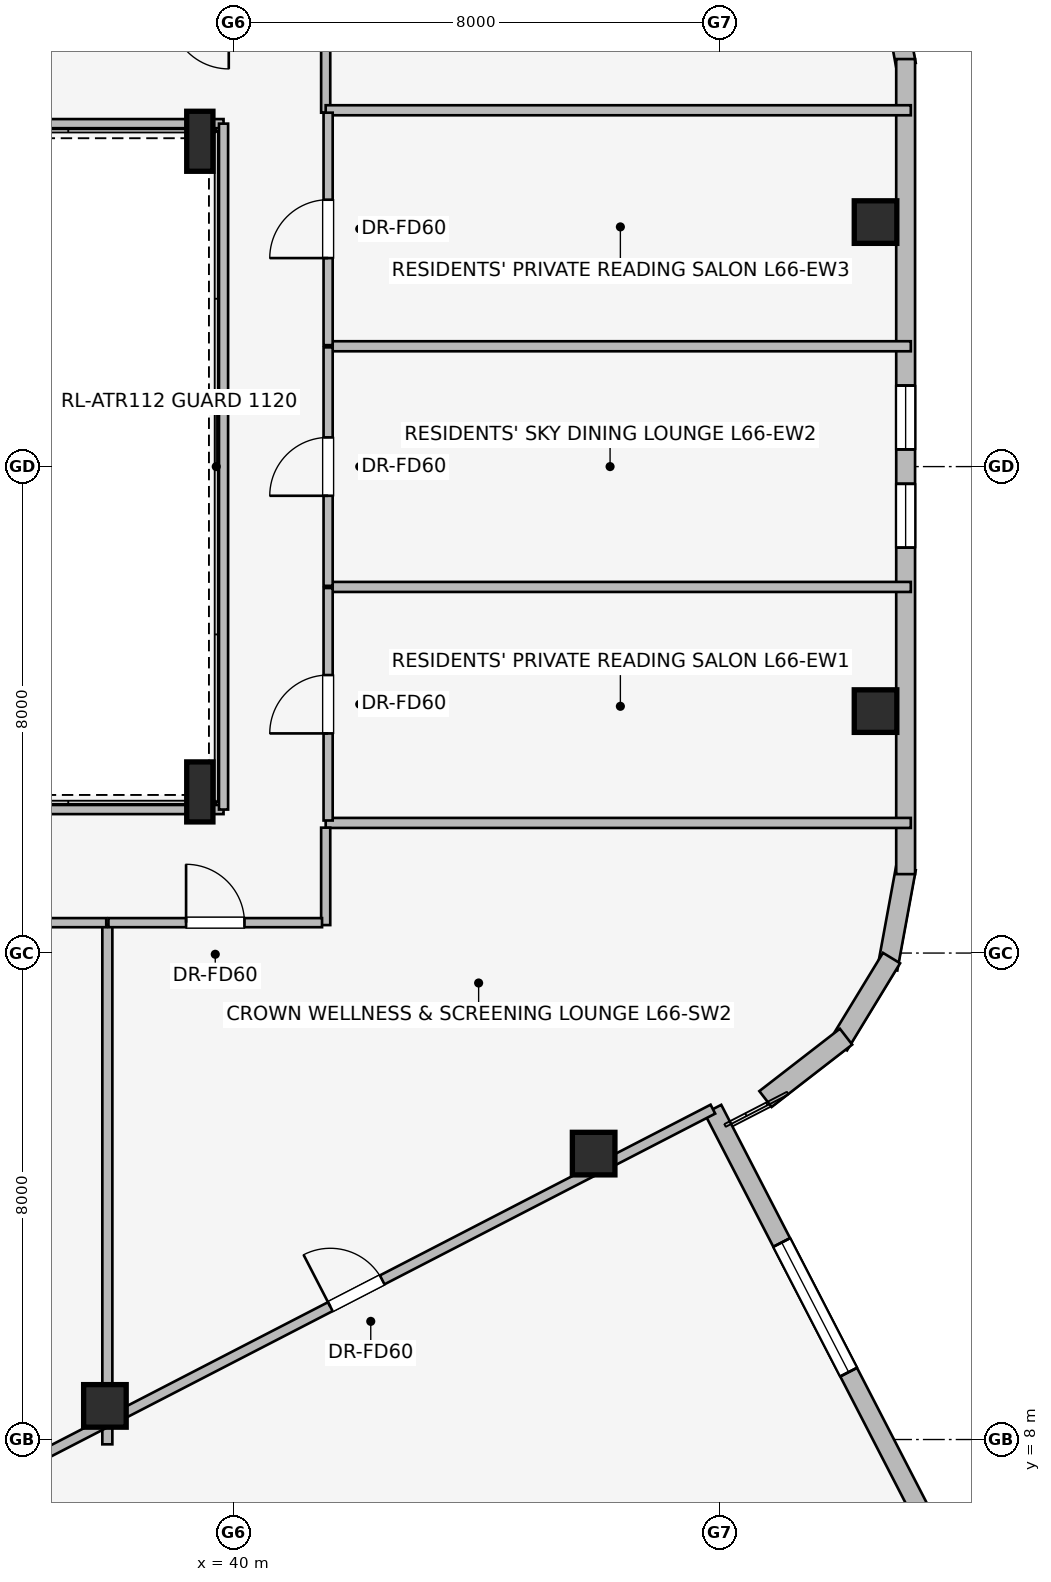
"""IFC4 building model, lengths in metres.
Left out: names, types, materials, properties, quantities, classifications, styles, units other than length and angle.
Written with IfcOpenShell. Run it as: python <this file> out.ifc"""

import sys

from ifc_helpers import new_model, si_unit, direction, frame, frame_2d, origin, origin_2d, place, context, subcontext, project, spatial, rectangle, i_section, extrude, element, fill, save


model = new_model("IFC4")
c1 = context("Model", 3, precision=1e-05, world=origin(), true_north=direction((0.0, 1.0)))
c2 = subcontext(c1, "Body", "Model", "MODEL_VIEW")
j1 = project(units=[si_unit("LENGTHUNIT", "METRE"), si_unit("PLANEANGLEUNIT", "RADIAN")], contexts=[c1])
p1 = place(None, origin())
s1 = spatial("IfcSite", under=j1, at=p1, CompositionType="ELEMENT")
p2 = place(p1, origin())
s2 = spatial("IfcBuilding", under=s1, at=p2, CompositionType="ELEMENT")
p3 = place(p2, frame((0.0, 0.0, 241.9)))
s3 = spatial("IfcBuildingStorey", under=s2, at=p3, CompositionType="ELEMENT", Elevation=241.9)
for number, where, z_axis, x_axis in (
    (1, (37.889, 8.553, 0.0), (0.0, 0.0, 1.0), (1.0, 0.0, 0.0)),
    (2, (45.927, 12.702, 0.0), (0.0, 0.0, 1.0), (1.0, 0.0, 0.0)),
    (3, (50.563, 19.979, 0.0), (0.0, 0.0, 1.0), (1.0, 0.0, 0.0)),
    (4, (50.563, 28.021, 0.0), (0.0, 0.0, 1.0), (1.0, 0.0, 0.0)),
):
    element("IfcColumn", number, at=place(p3, frame(where, z_axis=z_axis, x_axis=x_axis)), inside=s3, PredefinedType="COLUMN", context=c2, shape_type="SweptSolid", body=[
        extrude(rectangle(XDim=0.7, YDim=0.7, at=origin_2d()), origin(), (0.0, 0.0, 1.0), 3.55),
    ])
for number, where, z_axis, x_axis in (
    (5, (39.45, 18.65, 0.0), (0.0, 0.0, 1.0), (1.0, 0.0, 0.0)),
    (6, (39.45, 29.35, 0.0), (0.0, 0.0, 1.0), (1.0, 0.0, 0.0)),
):
    element("IfcColumn", number, at=place(p3, frame(where, z_axis=z_axis, x_axis=x_axis)), inside=s3, PredefinedType="COLUMN", context=c2, shape_type="SweptSolid", body=[
        extrude(i_section(OverallWidth=0.431, OverallDepth=0.987, WebThickness=0.034, FlangeThickness=0.062, at=origin_2d()), origin(), (0.0, 0.0, 1.0), 3.55),
    ])
p4 = place(p3, frame((50.759, 32.257, 0.0), z_axis=(0.0, 0.0, 1.0), x_axis=(0.180691763044, -0.983539773862, 0.0)))
e7 = element("IfcWall", 7, at=p4, inside=s3, PredefinedType="STANDARD", context=c2, shape_type="SweptSolid", body=[
    extrude(rectangle(XDim=1.677, YDim=0.33, at=frame_2d((0.838, 0.0))), origin(), (0.0, 0.0, 1.0), 3.29),
])
p5 = place(p3, frame((45.241, -10.216, 0.0), z_axis=(0.0, 0.0, 1.0), x_axis=(-0.45873211625, 0.888574614493, 0.0)))
e8 = element("IfcWall", 8, at=p5, inside=s3, PredefinedType="STANDARD", context=c2, shape_type="SweptSolid", body=[
    extrude(rectangle(XDim=19.8, YDim=0.31, at=frame_2d((9.9, 0.0))), origin(), (0.0, 0.0, 1.0), 3.29),
])
p6 = place(p5, frame((2.467, 0.0, 0.75)))
e9 = element("IfcOpeningElement", 9, at=p6, cuts=e8, PredefinedType="OPENING", context=c2, shape_type="SweptSolid", body=[
    extrude(rectangle(XDim=2.4, YDim=1.6, at=frame_2d((1.2, 0.8))), frame((0.0, 0.165, 0.0), z_axis=(0.0, -1.0, 0.0), x_axis=(1.0, 0.0, 0.0)), (0.0, 0.0, 1.0), 0.33),
])
p7 = place(p5, frame((8.7, 0.0, 0.75)))
e10 = element("IfcOpeningElement", 10, at=p7, cuts=e8, PredefinedType="OPENING", context=c2, shape_type="SweptSolid", body=[
    extrude(rectangle(XDim=2.4, YDim=1.6, at=frame_2d((1.2, 0.8))), frame((0.0, 0.165, 0.0), z_axis=(0.0, -1.0, 0.0), x_axis=(1.0, 0.0, 0.0)), (0.0, 0.0, 1.0), 0.33),
])
p8 = place(p5, frame((14.934, 0.0, 0.75)))
e11 = element("IfcOpeningElement", 11, at=p8, cuts=e8, PredefinedType="OPENING", context=c2, shape_type="SweptSolid", body=[
    extrude(rectangle(XDim=2.4, YDim=1.6, at=frame_2d((1.2, 0.8))), frame((0.0, 0.165, 0.0), z_axis=(0.0, -1.0, 0.0), x_axis=(1.0, 0.0, 0.0)), (0.0, 0.0, 1.0), 0.33),
])
p9 = place(p3, frame((47.888, 13.433, 0.0), z_axis=(0.0, 0.0, 1.0), x_axis=(0.458693173014, -0.888594718097, 0.0)))
e12 = element("IfcWall", 12, at=p9, inside=s3, PredefinedType="STANDARD", context=c2, shape_type="SweptSolid", body=[
    extrude(rectangle(XDim=19.8, YDim=0.31, at=frame_2d((9.9, 0.0))), origin(), (0.0, 0.0, 1.0), 3.29),
])
p10 = place(p9, frame((2.467, 0.0, 0.75)))
e13 = element("IfcOpeningElement", 13, at=p10, cuts=e12, PredefinedType="OPENING", context=c2, shape_type="SweptSolid", body=[
    extrude(rectangle(XDim=2.4, YDim=1.6, at=frame_2d((1.2, 0.8))), frame((0.0, 0.165, 0.0), z_axis=(0.0, -1.0, 0.0), x_axis=(1.0, 0.0, 0.0)), (0.0, 0.0, 1.0), 0.33),
])
p11 = place(p9, frame((8.7, 0.0, 0.75)))
e14 = element("IfcOpeningElement", 14, at=p11, cuts=e12, PredefinedType="OPENING", context=c2, shape_type="SweptSolid", body=[
    extrude(rectangle(XDim=2.4, YDim=1.6, at=frame_2d((1.2, 0.8))), frame((0.0, 0.165, 0.0), z_axis=(0.0, -1.0, 0.0), x_axis=(1.0, 0.0, 0.0)), (0.0, 0.0, 1.0), 0.33),
])
p12 = place(p9, frame((14.933, 0.0, 0.75)))
e15 = element("IfcOpeningElement", 15, at=p12, cuts=e12, PredefinedType="OPENING", context=c2, shape_type="SweptSolid", body=[
    extrude(rectangle(XDim=2.4, YDim=1.6, at=frame_2d((1.2, 0.8))), frame((0.0, 0.165, 0.0), z_axis=(0.0, -1.0, 0.0), x_axis=(1.0, 0.0, 0.0)), (0.0, 0.0, 1.0), 0.33),
])
p13 = place(p3, frame((51.062, 17.392, 0.0), z_axis=(0.0, 0.0, 1.0), x_axis=(-0.180691763044, -0.983539773862, 0.0)))
e16 = element("IfcWall", 16, at=p13, inside=s3, PredefinedType="STANDARD", context=c2, shape_type="SweptSolid", body=[
    extrude(rectangle(XDim=1.677, YDim=0.33, at=frame_2d((0.838, 0.0))), origin(), (0.0, 0.0, 1.0), 3.29),
])
p14 = place(p3, frame((50.826, 15.918, 0.0), z_axis=(0.0, 0.0, 1.0), x_axis=(-0.520325409202, -0.853968072318, 0.0)))
e17 = element("IfcWall", 17, at=p14, inside=s3, PredefinedType="STANDARD", context=c2, shape_type="SweptSolid", body=[
    extrude(rectangle(XDim=1.678, YDim=0.33, at=frame_2d((0.839, 0.0))), origin(), (0.0, 0.0, 1.0), 3.29),
])
p15 = place(p3, frame((50.078, 14.625, 0.0), z_axis=(0.0, 0.0, 1.0), x_axis=(-0.790691856293, -0.61221433207, 0.0)))
e18 = element("IfcWall", 18, at=p15, inside=s3, PredefinedType="STANDARD", context=c2, shape_type="SweptSolid", body=[
    extrude(rectangle(XDim=1.676, YDim=0.33, at=frame_2d((0.838, 0.0))), origin(), (0.0, 0.0, 1.0), 3.29),
])
p16 = place(p3, frame((51.058, 30.702, 0.0), z_axis=(0.0, 0.0, 1.0), x_axis=(0.0, -1.0, 0.0)))
e19 = element("IfcWall", 19, at=p16, inside=s3, PredefinedType="STANDARD", context=c2, shape_type="SweptSolid", body=[
    extrude(rectangle(XDim=13.404, YDim=0.31, at=frame_2d((6.702, 0.0))), origin(), (0.0, 0.0, 1.0), 3.29),
])
p17 = place(p16, frame((5.369, 0.0, 0.75)))
e20 = element("IfcOpeningElement", 20, at=p17, cuts=e19, PredefinedType="OPENING", context=c2, shape_type="SweptSolid", body=[
    extrude(rectangle(XDim=1.05, YDim=1.4, at=frame_2d((0.525, 0.7))), frame((0.0, 0.165, 0.0), z_axis=(0.0, -1.0, 0.0), x_axis=(1.0, 0.0, 0.0)), (0.0, 0.0, 1.0), 0.33),
])
p18 = place(p16, frame((6.985, 0.0, 0.75)))
e21 = element("IfcOpeningElement", 21, at=p18, cuts=e19, PredefinedType="OPENING", context=c2, shape_type="SweptSolid", body=[
    extrude(rectangle(XDim=1.05, YDim=1.4, at=frame_2d((0.525, 0.7))), frame((0.0, 0.165, 0.0), z_axis=(0.0, -1.0, 0.0), x_axis=(1.0, 0.0, 0.0)), (0.0, 0.0, 1.0), 0.33),
])
p19 = place(p3, frame((27.675, 18.36, 0.0), z_axis=(0.0, 0.0, 1.0), x_axis=(1.0, 0.0, 0.0)))
e22 = element("IfcWall", 22, at=p19, inside=s3, PredefinedType="PARTITIONING", context=c2, shape_type="SweptSolid", body=[
    extrude(rectangle(XDim=12.165, YDim=0.15, at=frame_2d((6.083, 0.0))), origin(), (0.0, 0.0, 1.0), 2.431),
])
p20 = place(p3, frame((39.84, 29.64, 0.0), z_axis=(0.0, 0.0, 1.0), x_axis=(-1.0, 0.0, 0.0)))
e23 = element("IfcWall", 23, at=p20, inside=s3, PredefinedType="PARTITIONING", context=c2, shape_type="SweptSolid", body=[
    extrude(rectangle(XDim=12.203, YDim=0.15, at=frame_2d((6.102, 0.0))), origin(), (0.0, 0.0, 1.0), 2.431),
])
p21 = place(p3, frame((39.84, 18.36, 0.0), z_axis=(0.0, 0.0, 1.0), x_axis=(0.0, 1.0, 0.0)))
e24 = element("IfcWall", 24, at=p21, inside=s3, PredefinedType="PARTITIONING", context=c2, shape_type="SweptSolid", body=[
    extrude(rectangle(XDim=11.28, YDim=0.15, at=frame_2d((5.64, 0.0))), origin(), (0.0, 0.0, 1.0), 3.29),
])
p22 = place(p3, frame((41.52, 29.82, 0.0), z_axis=(0.0, 0.0, 1.0), x_axis=(0.0, 1.0, 0.0)))
e25 = element("IfcWall", 25, at=p22, inside=s3, PredefinedType="PARTITIONING", context=c2, shape_type="SweptSolid", body=[
    extrude(rectangle(XDim=1.72, YDim=0.15, at=frame_2d((0.86, 0.0))), origin(), (0.0, 0.0, 1.0), 3.29),
])
for number, where, z_axis, x_axis in (
    (26, (41.52, 18.14, 0.0), (0.0, 0.0, 1.0), (1.0, 0.0, 0.0)),
    (27, (41.52, 29.86, 0.0), (0.0, 0.0, 1.0), (1.0, 0.0, 0.0)),
):
    element("IfcWall", number, at=place(p3, frame(where, z_axis=z_axis, x_axis=x_axis)), inside=s3, PredefinedType="PARTITIONING", context=c2, shape_type="SweptSolid", body=[
        extrude(rectangle(XDim=9.623, YDim=0.165, at=frame_2d((4.812, 0.0))), origin(), (0.0, 0.0, 1.0), 3.29),
    ])
for number, where, z_axis, x_axis in (
    (28, (41.59, 22.021, 0.0), (0.0, 0.0, 1.0), (1.0, 0.0, 0.0)),
    (29, (41.59, 25.979, 0.0), (0.0, 0.0, 1.0), (1.0, 0.0, 0.0)),
):
    element("IfcWall", number, at=place(p3, frame(where, z_axis=z_axis, x_axis=x_axis)), inside=s3, PredefinedType="PARTITIONING", context=c2, shape_type="SweptSolid", body=[
        extrude(rectangle(XDim=9.553, YDim=0.165, at=frame_2d((4.776, 0.0))), origin(), (0.0, 0.0, 1.0), 3.29),
    ])
p23 = place(p3, frame((41.56, 18.18, 0.0), z_axis=(0.0, 0.0, 1.0), x_axis=(0.0, 1.0, 0.0)))
e30 = element("IfcWall", 30, at=p23, inside=s3, PredefinedType="PARTITIONING", context=c2, shape_type="SweptSolid", body=[
    extrude(rectangle(XDim=3.823, YDim=0.15, at=frame_2d((1.912, 0.0))), origin(), (0.0, 0.0, 1.0), 3.29),
])
p24 = place(p23, frame((1.432, 0.0, 0.0)))
e31 = element("IfcOpeningElement", 31, at=p24, cuts=e30, PredefinedType="OPENING", context=c2, shape_type="SweptSolid", body=[
    extrude(rectangle(XDim=0.96, YDim=2.0, at=frame_2d((0.48, 1.0))), frame((0.0, 0.085, 0.0), z_axis=(0.0, -1.0, 0.0), x_axis=(1.0, 0.0, 0.0)), (0.0, 0.0, 1.0), 0.17),
])
p25 = place(p3, frame((41.56, 22.039, 0.0), z_axis=(0.0, 0.0, 1.0), x_axis=(0.0, 1.0, 0.0)))
e32 = element("IfcWall", 32, at=p25, inside=s3, PredefinedType="PARTITIONING", context=c2, shape_type="SweptSolid", body=[
    extrude(rectangle(XDim=3.922, YDim=0.15, at=frame_2d((1.961, 0.0))), origin(), (0.0, 0.0, 1.0), 3.29),
])
p26 = place(p25, frame((1.481, 0.0, 0.0)))
e33 = element("IfcOpeningElement", 33, at=p26, cuts=e32, PredefinedType="OPENING", context=c2, shape_type="SweptSolid", body=[
    extrude(rectangle(XDim=0.96, YDim=2.0, at=frame_2d((0.48, 1.0))), frame((0.0, 0.085, 0.0), z_axis=(0.0, -1.0, 0.0), x_axis=(1.0, 0.0, 0.0)), (0.0, 0.0, 1.0), 0.17),
])
p27 = place(p3, frame((41.56, 25.997, 0.0), z_axis=(0.0, 0.0, 1.0), x_axis=(0.0, 1.0, 0.0)))
e34 = element("IfcWall", 34, at=p27, inside=s3, PredefinedType="PARTITIONING", context=c2, shape_type="SweptSolid", body=[
    extrude(rectangle(XDim=3.823, YDim=0.15, at=frame_2d((1.912, 0.0))), origin(), (0.0, 0.0, 1.0), 3.29),
])
p28 = place(p27, frame((1.432, 0.0, 0.0)))
e35 = element("IfcOpeningElement", 35, at=p28, cuts=e34, PredefinedType="OPENING", context=c2, shape_type="SweptSolid", body=[
    extrude(rectangle(XDim=0.96, YDim=2.0, at=frame_2d((0.48, 1.0))), frame((0.0, 0.085, 0.0), z_axis=(0.0, -1.0, 0.0), x_axis=(1.0, 0.0, 0.0)), (0.0, 0.0, 1.0), 0.17),
])
p29 = place(p3, frame((41.52, 16.46, 0.0), z_axis=(0.0, 0.0, 1.0), x_axis=(0.0, 1.0, 0.0)))
e36 = element("IfcWall", 36, at=p29, inside=s3, PredefinedType="PARTITIONING", context=c2, shape_type="SweptSolid", body=[
    extrude(rectangle(XDim=1.602, YDim=0.15, at=frame_2d((0.801, 0.0))), origin(), (0.0, 0.0, 1.0), 3.29),
])
p30 = place(p3, frame((37.929, 7.921, 0.0), z_axis=(0.0, 0.0, 1.0), x_axis=(0.0, 1.0, 0.0)))
e37 = element("IfcWall", 37, at=p30, inside=s3, PredefinedType="PARTITIONING", context=c2, shape_type="SweptSolid", body=[
    extrude(rectangle(XDim=8.549, YDim=0.165, at=frame_2d((4.274, 0.0))), origin(), (0.0, 0.0, 1.0), 2.679),
])
p31 = place(p3, frame((32.85, 16.5, 0.0), z_axis=(0.0, 0.0, 1.0), x_axis=(1.0, 0.0, 0.0)))
e38 = element("IfcWall", 38, at=p31, inside=s3, PredefinedType="PARTITIONING", context=c2, shape_type="SweptSolid", body=[
    extrude(rectangle(XDim=5.061, YDim=0.15, at=frame_2d((2.53, 0.0))), origin(), (0.0, 0.0, 1.0), 3.29),
])
p32 = place(p31, frame((2.051, 0.0, 0.0)))
e39 = element("IfcOpeningElement", 39, at=p32, cuts=e38, PredefinedType="OPENING", context=c2, shape_type="SweptSolid", body=[
    extrude(rectangle(XDim=0.96, YDim=2.0, at=frame_2d((0.48, 1.0))), frame((0.0, 0.085, 0.0), z_axis=(0.0, -1.0, 0.0), x_axis=(1.0, 0.0, 0.0)), (0.0, 0.0, 1.0), 0.17),
])
p33 = place(p3, frame((37.947, 16.5, 0.0), z_axis=(0.0, 0.0, 1.0), x_axis=(1.0, 0.0, 0.0)))
e40 = element("IfcWall", 40, at=p33, inside=s3, PredefinedType="PARTITIONING", context=c2, shape_type="SweptSolid", body=[
    extrude(rectangle(XDim=3.513, YDim=0.15, at=frame_2d((1.756, 0.0))), origin(), (0.0, 0.0, 1.0), 3.29),
])
p34 = place(p33, frame((1.277, 0.0, 0.0)))
e41 = element("IfcOpeningElement", 41, at=p34, cuts=e40, PredefinedType="OPENING", context=c2, shape_type="SweptSolid", body=[
    extrude(rectangle(XDim=0.96, YDim=2.0, at=frame_2d((0.48, 1.0))), frame((0.0, 0.085, 0.0), z_axis=(0.0, -1.0, 0.0), x_axis=(1.0, 0.0, 0.0)), (0.0, 0.0, 1.0), 0.17),
])
p35 = place(p3, frame((36.158, 7.378, 0.0), z_axis=(0.0, 0.0, 1.0), x_axis=(0.88859001822, 0.458702277648, 0.0)))
e42 = element("IfcWall", 42, at=p35, inside=s3, PredefinedType="PARTITIONING", context=c2, shape_type="SweptSolid", body=[
    extrude(rectangle(XDim=13.201, YDim=0.165, at=frame_2d((6.6, 0.0))), origin(), (0.0, 0.0, 1.0), 2.741),
])
p36 = place(p35, frame((6.12, 0.0, 0.0)))
e43 = element("IfcOpeningElement", 43, at=p36, cuts=e42, PredefinedType="OPENING", context=c2, shape_type="SweptSolid", body=[
    extrude(rectangle(XDim=0.96, YDim=2.0, at=frame_2d((0.48, 1.0))), frame((0.0, 0.093, 0.0), z_axis=(0.0, -1.0, 0.0), x_axis=(1.0, 0.0, 0.0)), (0.0, 0.0, 1.0), 0.185),
])
p37 = place(p10, origin())
e44 = element("IfcWindow", 44, at=p37, inside=s3, PartitioningType="SINGLE_PANEL", PredefinedType="WINDOW", context=c2, shape_type="SweptSolid", body=[
    extrude(rectangle(XDim=2.4, YDim=1.6, at=frame_2d((1.2, 0.8))), frame((0.0, 0.03, 0.0), z_axis=(0.0, -1.0, 0.0), x_axis=(1.0, 0.0, 0.0)), (0.0, 0.0, 1.0), 0.06),
])
fill(e13, e44)
p38 = place(p17, origin())
e45 = element("IfcWindow", 45, at=p38, inside=s3, PartitioningType="SINGLE_PANEL", PredefinedType="WINDOW", context=c2, shape_type="SweptSolid", body=[
    extrude(rectangle(XDim=1.05, YDim=1.4, at=frame_2d((0.525, 0.7))), frame((0.0, 0.03, 0.0), z_axis=(0.0, -1.0, 0.0), x_axis=(1.0, 0.0, 0.0)), (0.0, 0.0, 1.0), 0.06),
])
fill(e20, e45)
p39 = place(p18, origin())
e46 = element("IfcWindow", 46, at=p39, inside=s3, PartitioningType="SINGLE_PANEL", PredefinedType="WINDOW", context=c2, shape_type="SweptSolid", body=[
    extrude(rectangle(XDim=1.05, YDim=1.4, at=frame_2d((0.525, 0.7))), frame((0.0, 0.03, 0.0), z_axis=(0.0, -1.0, 0.0), x_axis=(1.0, 0.0, 0.0)), (0.0, 0.0, 1.0), 0.06),
])
fill(e21, e46)
p40 = place(p24, origin())
e47 = element("IfcDoor", 47, at=p40, inside=s3, OperationType="SINGLE_SWING_LEFT", PredefinedType="DOOR", context=c2, shape_type="SweptSolid", body=[
    extrude(rectangle(XDim=0.96, YDim=2.0, at=frame_2d((0.48, 1.0))), frame((0.0, 0.025, 0.0), z_axis=(0.0, -1.0, 0.0), x_axis=(1.0, 0.0, 0.0)), (0.0, 0.0, 1.0), 0.05),
])
fill(e31, e47)
p41 = place(p26, origin())
e48 = element("IfcDoor", 48, at=p41, inside=s3, OperationType="SINGLE_SWING_LEFT", PredefinedType="DOOR", context=c2, shape_type="SweptSolid", body=[
    extrude(rectangle(XDim=0.96, YDim=2.0, at=frame_2d((0.48, 1.0))), frame((0.0, 0.025, 0.0), z_axis=(0.0, -1.0, 0.0), x_axis=(1.0, 0.0, 0.0)), (0.0, 0.0, 1.0), 0.05),
])
fill(e33, e48)
p42 = place(p28, origin())
e49 = element("IfcDoor", 49, at=p42, inside=s3, OperationType="SINGLE_SWING_LEFT", PredefinedType="DOOR", context=c2, shape_type="SweptSolid", body=[
    extrude(rectangle(XDim=0.96, YDim=2.0, at=frame_2d((0.48, 1.0))), frame((0.0, 0.025, 0.0), z_axis=(0.0, -1.0, 0.0), x_axis=(1.0, 0.0, 0.0)), (0.0, 0.0, 1.0), 0.05),
])
fill(e35, e49)
p43 = place(p34, origin())
e50 = element("IfcDoor", 50, at=p43, inside=s3, OperationType="SINGLE_SWING_LEFT", PredefinedType="DOOR", context=c2, shape_type="SweptSolid", body=[
    extrude(rectangle(XDim=0.96, YDim=2.0, at=frame_2d((0.48, 1.0))), frame((0.0, 0.025, 0.0), z_axis=(0.0, -1.0, 0.0), x_axis=(1.0, 0.0, 0.0)), (0.0, 0.0, 1.0), 0.05),
])
fill(e41, e50)
p44 = place(p36, origin())
e51 = element("IfcDoor", 51, at=p44, inside=s3, OperationType="SINGLE_SWING_LEFT", PredefinedType="DOOR", context=c2, shape_type="SweptSolid", body=[
    extrude(rectangle(XDim=0.96, YDim=2.0, at=frame_2d((0.48, 1.0))), frame((0.0, 0.025, 0.0), z_axis=(0.0, -1.0, 0.0), x_axis=(1.0, 0.0, 0.0)), (0.0, 0.0, 1.0), 0.05),
])
fill(e43, e51)
save(model, sys.argv[1])
